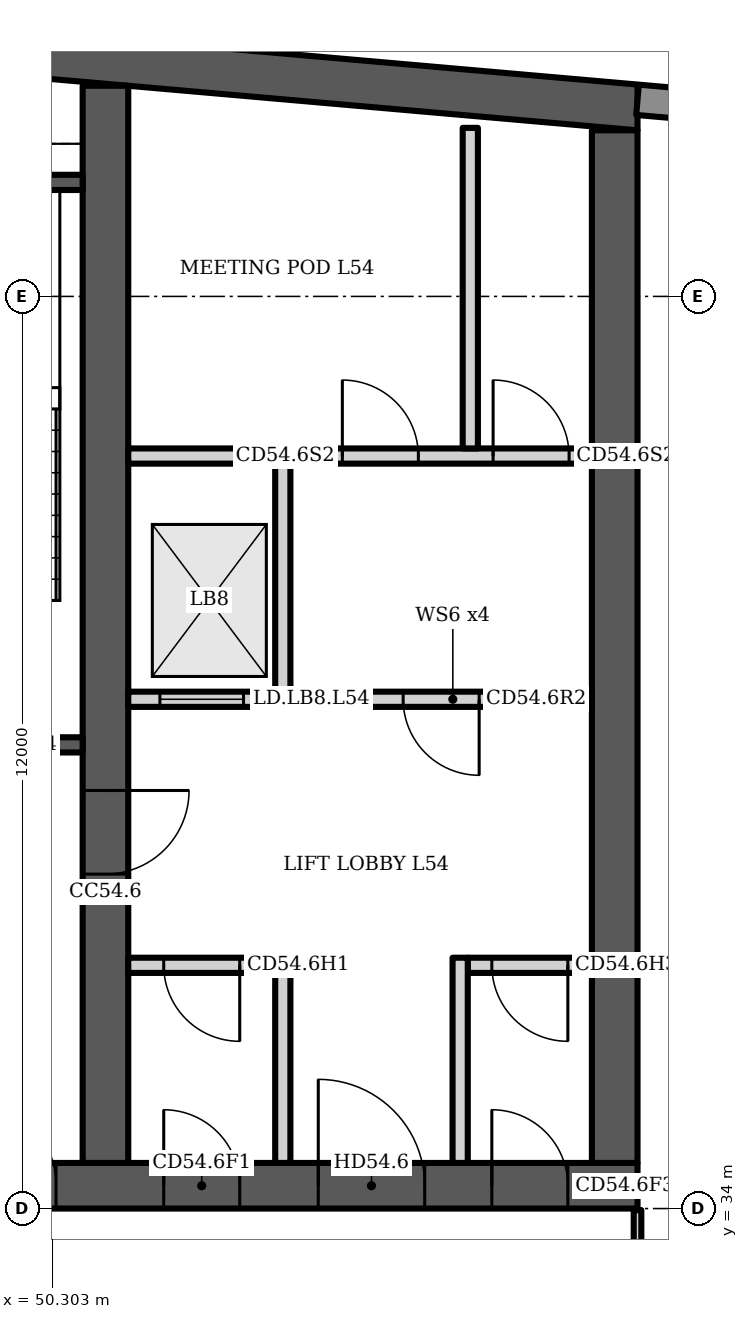
"""IFC4 building model, lengths in metres.
Left out: names, types, materials, properties, quantities, classifications, styles, units other than length and angle.
Written with IfcOpenShell. Run it as: python <this file> out.ifc"""

import sys

from ifc_helpers import new_model, si_unit, direction, frame, frame_2d, origin, place, context, subcontext, project, spatial, polyline, rectangle, outline, extrude, element, fill, save


model = new_model("IFC4")
c1 = context("Model", 3, precision=1e-05, world=origin(), true_north=direction((0.0, 1.0)))
c2 = subcontext(c1, "Body", "Model", "MODEL_VIEW")
j1 = project(units=[si_unit("LENGTHUNIT", "METRE"), si_unit("PLANEANGLEUNIT", "RADIAN")], contexts=[c1])
p1 = place(None, origin())
s1 = spatial("IfcSite", under=j1, at=p1, CompositionType="ELEMENT")
p2 = place(p1, origin())
s2 = spatial("IfcBuilding", under=s1, at=p2, CompositionType="ELEMENT")
p3 = place(p2, frame((0.0, 0.0, 217.9)))
s3 = spatial("IfcBuildingStorey", under=s2, at=p3, CompositionType="ELEMENT", Elevation=217.9)
p4 = place(p3, origin())
e1 = element("IfcWall", 1, at=p4, inside=s3, PredefinedType="SHEAR", context=c2, shape_type="SweptSolid", body=[
    extrude(outline(polyline([(23.0, 48.185), (40.5, 49.716), (58.0, 48.185), (58.0, 48.787), (40.5, 50.318), (23.0, 48.787), (23.0, 48.185)])), origin(), (0.0, 0.0, 1.0), 3.6),
])
p5 = place(p3, frame((23.0, 34.3, 0.0), z_axis=(0.0, 0.0, 1.0), x_axis=(1.0, 0.0, 0.0)))
e2 = element("IfcWall", 2, at=p5, inside=s3, PredefinedType="SHEAR", context=c2, shape_type="SweptSolid", body=[
    extrude(rectangle(XDim=35.0, YDim=0.6, at=frame_2d((17.5, 0.0))), origin(), (0.0, 0.0, 1.0), 3.6),
])
p6 = place(p5, frame((0.65, 0.0, 0.0)))
e3 = element("IfcOpeningElement", 3, at=p6, cuts=e2, PredefinedType="OPENING", context=c2, shape_type="SweptSolid", body=[
    extrude(rectangle(XDim=1.2, YDim=2.1, at=frame_2d((0.6, 1.05))), frame((0.0, 0.31, 0.0), z_axis=(0.0, -1.0, 0.0), x_axis=(1.0, 0.0, 0.0)), (0.0, 0.0, 1.0), 0.62),
])
p7 = place(p5, frame((7.717, 0.0, 0.0)))
e4 = element("IfcOpeningElement", 4, at=p7, cuts=e2, PredefinedType="OPENING", context=c2, shape_type="SweptSolid", body=[
    extrude(rectangle(XDim=1.1, YDim=2.1, at=frame_2d((0.55, 1.05))), frame((0.0, 0.31, 0.0), z_axis=(0.0, -1.0, 0.0), x_axis=(1.0, 0.0, 0.0)), (0.0, 0.0, 1.0), 0.62),
])
p8 = place(p5, frame((12.183, 0.0, 0.0)))
e5 = element("IfcOpeningElement", 5, at=p8, cuts=e2, PredefinedType="OPENING", context=c2, shape_type="SweptSolid", body=[
    extrude(rectangle(XDim=1.1, YDim=2.1, at=frame_2d((0.55, 1.05))), frame((0.0, 0.31, 0.0), z_axis=(0.0, -1.0, 0.0), x_axis=(1.0, 0.0, 0.0)), (0.0, 0.0, 1.0), 0.62),
])
p9 = place(p5, frame((9.8, 0.0, 0.0)))
e6 = element("IfcOpeningElement", 6, at=p9, cuts=e2, PredefinedType="OPENING", context=c2, shape_type="SweptSolid", body=[
    extrude(rectangle(XDim=1.4, YDim=2.1, at=frame_2d((0.7, 1.05))), frame((0.0, 0.31, 0.0), z_axis=(0.0, -1.0, 0.0), x_axis=(1.0, 0.0, 0.0)), (0.0, 0.0, 1.0), 0.62),
])
p10 = place(p5, frame((14.717, 0.0, 0.0)))
e7 = element("IfcOpeningElement", 7, at=p10, cuts=e2, PredefinedType="OPENING", context=c2, shape_type="SweptSolid", body=[
    extrude(rectangle(XDim=1.1, YDim=2.1, at=frame_2d((0.55, 1.05))), frame((0.0, 0.31, 0.0), z_axis=(0.0, -1.0, 0.0), x_axis=(1.0, 0.0, 0.0)), (0.0, 0.0, 1.0), 0.62),
])
p11 = place(p5, frame((16.95, 0.0, 0.0)))
e8 = element("IfcOpeningElement", 8, at=p11, cuts=e2, PredefinedType="OPENING", context=c2, shape_type="SweptSolid", body=[
    extrude(rectangle(XDim=1.1, YDim=2.1, at=frame_2d((0.55, 1.05))), frame((0.0, 0.31, 0.0), z_axis=(0.0, -1.0, 0.0), x_axis=(1.0, 0.0, 0.0)), (0.0, 0.0, 1.0), 0.62),
])
p12 = place(p5, frame((19.183, 0.0, 0.0)))
e9 = element("IfcOpeningElement", 9, at=p12, cuts=e2, PredefinedType="OPENING", context=c2, shape_type="SweptSolid", body=[
    extrude(rectangle(XDim=1.1, YDim=2.1, at=frame_2d((0.55, 1.05))), frame((0.0, 0.31, 0.0), z_axis=(0.0, -1.0, 0.0), x_axis=(1.0, 0.0, 0.0)), (0.0, 0.0, 1.0), 0.62),
])
p13 = place(p5, frame((26.15, 0.0, 0.0)))
e10 = element("IfcOpeningElement", 10, at=p13, cuts=e2, PredefinedType="OPENING", context=c2, shape_type="SweptSolid", body=[
    extrude(rectangle(XDim=1.2, YDim=2.1, at=frame_2d((0.6, 1.05))), frame((0.0, 0.31, 0.0), z_axis=(0.0, -1.0, 0.0), x_axis=(1.0, 0.0, 0.0)), (0.0, 0.0, 1.0), 0.62),
])
p14 = place(p5, frame((28.767, 0.0, 0.0)))
e11 = element("IfcOpeningElement", 11, at=p14, cuts=e2, PredefinedType="OPENING", context=c2, shape_type="SweptSolid", body=[
    extrude(rectangle(XDim=1.0, YDim=2.1, at=frame_2d((0.5, 1.05))), frame((0.0, 0.31, 0.0), z_axis=(0.0, -1.0, 0.0), x_axis=(1.0, 0.0, 0.0)), (0.0, 0.0, 1.0), 0.62),
])
p15 = place(p5, frame((33.083, 0.0, 0.0)))
e12 = element("IfcOpeningElement", 12, at=p15, cuts=e2, PredefinedType="OPENING", context=c2, shape_type="SweptSolid", body=[
    extrude(rectangle(XDim=1.0, YDim=2.1, at=frame_2d((0.5, 1.05))), frame((0.0, 0.31, 0.0), z_axis=(0.0, -1.0, 0.0), x_axis=(1.0, 0.0, 0.0)), (0.0, 0.0, 1.0), 0.62),
])
p16 = place(p5, frame((30.8, 0.0, 0.0)))
e13 = element("IfcOpeningElement", 13, at=p16, cuts=e2, PredefinedType="OPENING", context=c2, shape_type="SweptSolid", body=[
    extrude(rectangle(XDim=1.4, YDim=2.1, at=frame_2d((0.7, 1.05))), frame((0.0, 0.31, 0.0), z_axis=(0.0, -1.0, 0.0), x_axis=(1.0, 0.0, 0.0)), (0.0, 0.0, 1.0), 0.62),
])
p17 = place(p3, frame((51.0, 34.6, 0.0), z_axis=(0.0, 0.0, 1.0), x_axis=(0.0, 1.0, 0.0)))
e14 = element("IfcWall", 14, at=p17, inside=s3, PredefinedType="SHEAR", context=c2, shape_type="SweptSolid", body=[
    extrude(rectangle(XDim=14.171, YDim=0.6, at=frame_2d((7.085, 0.0))), origin(), (0.0, 0.0, 1.0), 3.6),
])
p18 = place(p17, frame((3.8, 0.0, 0.0)))
e15 = element("IfcOpeningElement", 15, at=p18, cuts=e14, PredefinedType="OPENING", context=c2, shape_type="SweptSolid", body=[
    extrude(rectangle(XDim=1.1, YDim=2.1, at=frame_2d((0.55, 1.05))), frame((0.0, 0.31, 0.0), z_axis=(0.0, -1.0, 0.0), x_axis=(1.0, 0.0, 0.0)), (0.0, 0.0, 1.0), 0.62),
])
p19 = place(p3, frame((57.7, 34.6, 0.0), z_axis=(0.0, 0.0, 1.0), x_axis=(0.0, 1.0, 0.0)))
e16 = element("IfcWall", 16, at=p19, inside=s3, PredefinedType="SHEAR", context=c2, shape_type="SweptSolid", body=[
    extrude(rectangle(XDim=13.585, YDim=0.6, at=frame_2d((6.792, 0.0))), origin(), (0.0, 0.0, 1.0), 3.6),
])
p20 = place(p3, frame((60.983, 48.326, 0.0), z_axis=(0.0, 0.0, 1.0), x_axis=(-0.996194, 0.087168, 0.0)))
e17 = element("IfcWall", 17, at=p20, inside=s3, PredefinedType="SOLIDWALL", context=c2, shape_type="SweptSolid", body=[
    extrude(rectangle(XDim=2.994, YDim=0.4, at=frame_2d((1.497, 0.0))), origin(), (0.0, 0.0, 1.0), 3.2),
])
p21 = place(p3, frame((44.3, 40.1, 0.0), z_axis=(0.0, 0.0, 1.0), x_axis=(1.0, 0.0, 0.0)))
e18 = element("IfcWall", 18, at=p21, inside=s3, PredefinedType="SHEAR", context=c2, shape_type="SweptSolid", body=[
    extrude(rectangle(XDim=6.4, YDim=0.2, at=frame_2d((3.2, 0.0))), origin(), (0.0, 0.0, 1.0), 3.2),
])
p22 = place(p21, frame((3.625, 0.0, 0.0)))
e19 = element("IfcOpeningElement", 19, at=p22, cuts=e18, PredefinedType="OPENING", context=c2, shape_type="SweptSolid", body=[
    extrude(rectangle(XDim=1.2, YDim=2.1, at=frame_2d((0.6, 1.05))), frame((0.0, 0.11, 0.0), z_axis=(0.0, -1.0, 0.0), x_axis=(1.0, 0.0, 0.0)), (0.0, 0.0, 1.0), 0.22),
])
p23 = place(p21, frame((0.625, 0.0, 0.0)))
e20 = element("IfcOpeningElement", 20, at=p23, cuts=e18, PredefinedType="OPENING", context=c2, shape_type="SweptSolid", body=[
    extrude(rectangle(XDim=0.9, YDim=2.1, at=frame_2d((0.45, 1.05))), frame((0.0, 0.11, 0.0), z_axis=(0.0, -1.0, 0.0), x_axis=(1.0, 0.0, 0.0)), (0.0, 0.0, 1.0), 0.22),
])
p24 = place(p3, frame((46.75, 47.5, 0.0), z_axis=(0.0, 0.0, 1.0), x_axis=(1.0, 0.0, 0.0)))
e21 = element("IfcWall", 21, at=p24, inside=s3, PredefinedType="SHEAR", context=c2, shape_type="SweptSolid", body=[
    extrude(rectangle(XDim=3.95, YDim=0.2, at=frame_2d((1.975, 0.0))), origin(), (0.0, 0.0, 1.0), 3.2),
])
p25 = place(p3, frame((51.3, 37.2, 0.0), z_axis=(0.0, 0.0, 1.0), x_axis=(1.0, 0.0, 0.0)))
e22 = element("IfcWall", 22, at=p25, inside=s3, PredefinedType="PARTITIONING", context=c2, shape_type="SweptSolid", body=[
    extrude(rectangle(XDim=1.933, YDim=0.2, at=frame_2d((0.967, 0.0))), origin(), (0.0, 0.0, 1.0), 3.2),
])
p26 = place(p25, frame((0.467, 0.0, 0.0)))
e23 = element("IfcOpeningElement", 23, at=p26, cuts=e22, PredefinedType="OPENING", context=c2, shape_type="SweptSolid", body=[
    extrude(rectangle(XDim=1.0, YDim=2.1, at=frame_2d((0.5, 1.05))), frame((0.0, 0.11, 0.0), z_axis=(0.0, -1.0, 0.0), x_axis=(1.0, 0.0, 0.0)), (0.0, 0.0, 1.0), 0.22),
])
p27 = place(p3, frame((55.767, 37.2, 0.0), z_axis=(0.0, 0.0, 1.0), x_axis=(1.0, 0.0, 0.0)))
e24 = element("IfcWall", 24, at=p27, inside=s3, PredefinedType="PARTITIONING", context=c2, shape_type="SweptSolid", body=[
    extrude(rectangle(XDim=1.633, YDim=0.2, at=frame_2d((0.817, 0.0))), origin(), (0.0, 0.0, 1.0), 3.2),
])
p28 = place(p27, frame((0.317, 0.0, 0.0)))
e25 = element("IfcOpeningElement", 25, at=p28, cuts=e24, PredefinedType="OPENING", context=c2, shape_type="SweptSolid", body=[
    extrude(rectangle(XDim=1.0, YDim=2.1, at=frame_2d((0.5, 1.05))), frame((0.0, 0.11, 0.0), z_axis=(0.0, -1.0, 0.0), x_axis=(1.0, 0.0, 0.0)), (0.0, 0.0, 1.0), 0.22),
])
p29 = place(p3, frame((51.3, 40.7, 0.0), z_axis=(0.0, 0.0, 1.0), x_axis=(1.0, 0.0, 0.0)))
e26 = element("IfcWall", 26, at=p29, inside=s3, PredefinedType="PARTITIONING", context=c2, shape_type="SweptSolid", body=[
    extrude(rectangle(XDim=6.1, YDim=0.2, at=frame_2d((3.05, 0.0))), origin(), (0.0, 0.0, 1.0), 3.2),
])
p30 = place(p29, frame((0.417, 0.0, 0.0)))
e27 = element("IfcOpeningElement", 27, at=p30, cuts=e26, PredefinedType="OPENING", context=c2, shape_type="SweptSolid", body=[
    extrude(rectangle(XDim=1.1, YDim=2.1, at=frame_2d((0.55, 1.05))), frame((0.0, 0.11, 0.0), z_axis=(0.0, -1.0, 0.0), x_axis=(1.0, 0.0, 0.0)), (0.0, 0.0, 1.0), 0.22),
])
p31 = place(p29, frame((3.617, 0.0, 0.0)))
e28 = element("IfcOpeningElement", 28, at=p31, cuts=e26, PredefinedType="OPENING", context=c2, shape_type="SweptSolid", body=[
    extrude(rectangle(XDim=1.0, YDim=2.1, at=frame_2d((0.5, 1.05))), frame((0.0, 0.11, 0.0), z_axis=(0.0, -1.0, 0.0), x_axis=(1.0, 0.0, 0.0)), (0.0, 0.0, 1.0), 0.22),
])
p32 = place(p3, frame((51.3, 43.9, 0.0), z_axis=(0.0, 0.0, 1.0), x_axis=(1.0, 0.0, 0.0)))
e29 = element("IfcWall", 29, at=p32, inside=s3, PredefinedType="PARTITIONING", context=c2, shape_type="SweptSolid", body=[
    extrude(rectangle(XDim=6.1, YDim=0.2, at=frame_2d((3.05, 0.0))), origin(), (0.0, 0.0, 1.0), 3.2),
])
p33 = place(p32, frame((2.817, 0.0, 0.0)))
e30 = element("IfcOpeningElement", 30, at=p33, cuts=e29, PredefinedType="OPENING", context=c2, shape_type="SweptSolid", body=[
    extrude(rectangle(XDim=1.0, YDim=2.1, at=frame_2d((0.5, 1.05))), frame((0.0, 0.11, 0.0), z_axis=(0.0, -1.0, 0.0), x_axis=(1.0, 0.0, 0.0)), (0.0, 0.0, 1.0), 0.22),
])
p34 = place(p32, frame((4.8, 0.0, 0.0)))
e31 = element("IfcOpeningElement", 31, at=p34, cuts=e29, PredefinedType="OPENING", context=c2, shape_type="SweptSolid", body=[
    extrude(rectangle(XDim=1.0, YDim=2.1, at=frame_2d((0.5, 1.05))), frame((0.0, 0.11, 0.0), z_axis=(0.0, -1.0, 0.0), x_axis=(1.0, 0.0, 0.0)), (0.0, 0.0, 1.0), 0.22),
])
p35 = place(p3, origin())
e32 = element("IfcWall", 32, at=p35, inside=s3, PredefinedType="PARTITIONING", context=c2, shape_type="SweptSolid", body=[
    extrude(outline(polyline([(53.233, 34.6), (53.233, 37.3), (53.433, 37.3), (53.433, 34.6), (53.233, 34.6)])), origin(), (0.0, 0.0, 1.0), 3.2),
])
p36 = place(p3, origin())
e33 = element("IfcWall", 33, at=p36, inside=s3, PredefinedType="PARTITIONING", context=c2, shape_type="SweptSolid", body=[
    extrude(outline(polyline([(55.567, 34.6), (55.567, 37.3), (55.767, 37.3), (55.767, 34.6), (55.567, 34.6)])), origin(), (0.0, 0.0, 1.0), 3.2),
])
p37 = place(p3, origin())
e34 = element("IfcWall", 34, at=p37, inside=s3, PredefinedType="PARTITIONING", context=c2, shape_type="SweptSolid", body=[
    extrude(outline(polyline([(53.433, 40.8), (53.433, 43.8), (53.233, 43.8), (53.233, 40.8), (53.433, 40.8)])), origin(), (0.0, 0.0, 1.0), 3.2),
])
p38 = place(p3, frame((55.8, 44.0, 0.0), z_axis=(0.0, 0.0, 1.0), x_axis=(0.0, 1.0, 0.0)))
e35 = element("IfcWall", 35, at=p38, inside=s3, PredefinedType="PARTITIONING", context=c2, shape_type="SweptSolid", body=[
    extrude(rectangle(XDim=4.218, YDim=0.2, at=frame_2d((2.109, 0.0))), origin(), (0.0, 0.0, 1.0), 3.2),
])
p39 = place(p3, frame((58.0, 30.5, 0.0), z_axis=(0.0, 0.0, 1.0), x_axis=(0.0, 1.0, 0.0)))
e36 = element("IfcWall", 36, at=p39, inside=s3, PredefinedType="PARTITIONING", context=c2, shape_type="SweptSolid", body=[
    extrude(rectangle(XDim=3.48, YDim=0.1, at=frame_2d((1.74, 0.0))), origin(), (0.0, 0.0, 1.0), 3.2),
])
p40 = place(p13, origin())
e37 = element("IfcDoor", 37, at=p40, inside=s3, OperationType="SINGLE_SWING_LEFT", PredefinedType="DOOR", context=c2, shape_type="SweptSolid", body=[
    extrude(rectangle(XDim=1.2, YDim=2.1, at=frame_2d((0.6, 1.05))), frame((0.0, 0.025, 0.0), z_axis=(0.0, -1.0, 0.0), x_axis=(1.0, 0.0, 0.0)), (0.0, 0.0, 1.0), 0.05),
])
fill(e10, e37)
p41 = place(p14, origin())
e38 = element("IfcDoor", 38, at=p41, inside=s3, OperationType="SINGLE_SWING_LEFT", PredefinedType="DOOR", context=c2, shape_type="SweptSolid", body=[
    extrude(rectangle(XDim=1.0, YDim=2.1, at=frame_2d((0.5, 1.05))), frame((0.0, 0.025, 0.0), z_axis=(0.0, -1.0, 0.0), x_axis=(1.0, 0.0, 0.0)), (0.0, 0.0, 1.0), 0.05),
])
fill(e11, e38)
p42 = place(p26, origin())
e39 = element("IfcDoor", 39, at=p42, inside=s3, OperationType="SINGLE_SWING_RIGHT", PredefinedType="DOOR", context=c2, shape_type="SweptSolid", body=[
    extrude(rectangle(XDim=1.0, YDim=2.1, at=frame_2d((0.5, 1.05))), frame((0.0, 0.025, 0.0), z_axis=(0.0, -1.0, 0.0), x_axis=(1.0, 0.0, 0.0)), (0.0, 0.0, 1.0), 0.05),
])
fill(e23, e39)
p43 = place(p15, origin())
e40 = element("IfcDoor", 40, at=p43, inside=s3, OperationType="SINGLE_SWING_LEFT", PredefinedType="DOOR", context=c2, shape_type="SweptSolid", body=[
    extrude(rectangle(XDim=1.0, YDim=2.1, at=frame_2d((0.5, 1.05))), frame((0.0, 0.025, 0.0), z_axis=(0.0, -1.0, 0.0), x_axis=(1.0, 0.0, 0.0)), (0.0, 0.0, 1.0), 0.05),
])
fill(e12, e40)
p44 = place(p28, origin())
e41 = element("IfcDoor", 41, at=p44, inside=s3, OperationType="SINGLE_SWING_RIGHT", PredefinedType="DOOR", context=c2, shape_type="SweptSolid", body=[
    extrude(rectangle(XDim=1.0, YDim=2.1, at=frame_2d((0.5, 1.05))), frame((0.0, 0.025, 0.0), z_axis=(0.0, -1.0, 0.0), x_axis=(1.0, 0.0, 0.0)), (0.0, 0.0, 1.0), 0.05),
])
fill(e25, e41)
p45 = place(p16, origin())
e42 = element("IfcDoor", 42, at=p45, inside=s3, OperationType="DOUBLE_DOOR_SINGLE_SWING", PredefinedType="DOOR", context=c2, shape_type="SweptSolid", body=[
    extrude(rectangle(XDim=1.4, YDim=2.1, at=frame_2d((0.7, 1.05))), frame((0.0, 0.025, 0.0), z_axis=(0.0, -1.0, 0.0), x_axis=(1.0, 0.0, 0.0)), (0.0, 0.0, 1.0), 0.05),
])
fill(e13, e42)
p46 = place(p30, origin())
e43 = element("IfcDoor", 43, at=p46, inside=s3, OperationType="DOUBLE_DOOR_SLIDING", PredefinedType="DOOR", context=c2, shape_type="SweptSolid", body=[
    extrude(rectangle(XDim=1.1, YDim=2.1, at=frame_2d((0.55, 1.05))), frame((0.0, 0.025, 0.0), z_axis=(0.0, -1.0, 0.0), x_axis=(1.0, 0.0, 0.0)), (0.0, 0.0, 1.0), 0.05),
])
fill(e27, e43)
p47 = place(p31, origin())
e44 = element("IfcDoor", 44, at=p47, inside=s3, OperationType="SINGLE_SWING_RIGHT", PredefinedType="DOOR", context=c2, shape_type="SweptSolid", body=[
    extrude(rectangle(XDim=1.0, YDim=2.1, at=frame_2d((0.5, 1.05))), frame((0.0, 0.025, 0.0), z_axis=(0.0, -1.0, 0.0), x_axis=(1.0, 0.0, 0.0)), (0.0, 0.0, 1.0), 0.05),
])
fill(e28, e44)
p48 = place(p33, origin())
e45 = element("IfcDoor", 45, at=p48, inside=s3, OperationType="SINGLE_SWING_LEFT", PredefinedType="DOOR", context=c2, shape_type="SweptSolid", body=[
    extrude(rectangle(XDim=1.0, YDim=2.1, at=frame_2d((0.5, 1.05))), frame((0.0, 0.025, 0.0), z_axis=(0.0, -1.0, 0.0), x_axis=(1.0, 0.0, 0.0)), (0.0, 0.0, 1.0), 0.05),
])
fill(e30, e45)
p49 = place(p34, origin())
e46 = element("IfcDoor", 46, at=p49, inside=s3, OperationType="SINGLE_SWING_LEFT", PredefinedType="DOOR", context=c2, shape_type="SweptSolid", body=[
    extrude(rectangle(XDim=1.0, YDim=2.1, at=frame_2d((0.5, 1.05))), frame((0.0, 0.025, 0.0), z_axis=(0.0, -1.0, 0.0), x_axis=(1.0, 0.0, 0.0)), (0.0, 0.0, 1.0), 0.05),
])
fill(e31, e46)
p50 = place(p18, origin())
e47 = element("IfcDoor", 47, at=p50, inside=s3, OperationType="SINGLE_SWING_RIGHT", PredefinedType="DOOR", context=c2, shape_type="SweptSolid", body=[
    extrude(rectangle(XDim=1.1, YDim=2.1, at=frame_2d((0.55, 1.05))), frame((0.0, 0.025, 0.0), z_axis=(0.0, -1.0, 0.0), x_axis=(1.0, 0.0, 0.0)), (0.0, 0.0, 1.0), 0.05),
])
fill(e15, e47)
save(model, sys.argv[1])
